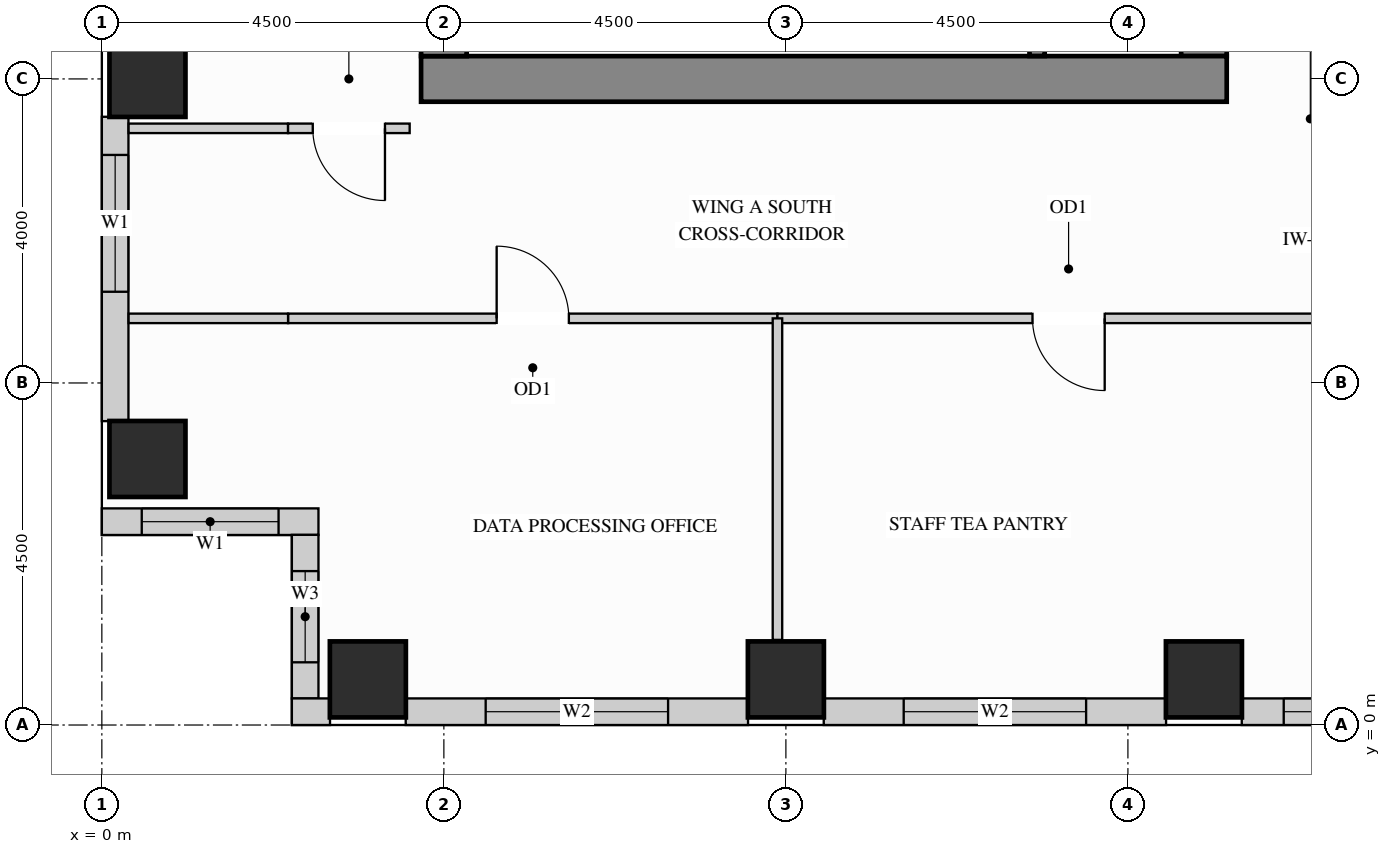
"""IFC4 building model, lengths in metres.
Left out: names, types, materials, properties, quantities, classifications, styles, units other than length and angle.
Written with IfcOpenShell. Run it as: python <this file> out.ifc"""

import sys

from ifc_helpers import new_model, si_unit, direction, frame, frame_2d, origin, origin_2d, place, context, subcontext, project, spatial, rectangle, extrude, source, transform, mapped, element, fill, save


model = new_model("IFC4")
c1 = context("Model", 3, precision=1e-05, world=origin(), true_north=direction((0.0, 1.0)))
c2 = subcontext(c1, "Body", "Model", "MODEL_VIEW")
j1 = project(units=[si_unit("LENGTHUNIT", "METRE"), si_unit("PLANEANGLEUNIT", "RADIAN")], contexts=[c1])
p1 = place(None, origin())
s1 = spatial("IfcSite", under=j1, at=p1, CompositionType="ELEMENT")
p2 = place(p1, origin())
s2 = spatial("IfcBuilding", under=s1, at=p2, CompositionType="ELEMENT")
p3 = place(p2, frame((0.0, 0.0, 186.3)))
s3 = spatial("IfcBuildingStorey", under=s2, at=p3, CompositionType="ELEMENT", Elevation=186.3)
m1 = source(origin(), c2, "Body", "SweptSolid", [
    extrude(rectangle(XDim=1.0, YDim=1.0, at=origin_2d()), origin(), (0.0, 0.0, 1.0), 3.4),
])
for number, where, z_axis, x_axis in (
    (1, (14.5, 0.6, 0.0), (0.0, 0.0, 1.0), (1.0, 0.0, 0.0)),
    (2, (3.5, 0.6, 0.0), (0.0, 0.0, 1.0), (1.0, 0.0, 0.0)),
    (3, (9.0, 0.6, 0.0), (0.0, 0.0, 1.0), (1.0, 0.0, 0.0)),
    (4, (0.6, 3.5, 0.0), (0.0, 0.0, 1.0), (1.0, 0.0, 0.0)),
    (5, (0.6, 8.5, 0.0), (0.0, 0.0, 1.0), (1.0, 0.0, 0.0)),
):
    element("IfcColumn", number, at=place(p3, frame(where, z_axis=z_axis, x_axis=x_axis)), inside=s3, PredefinedType="COLUMN", context=c2, shape_type="MappedRepresentation", body=[
        mapped(m1, transform((0.0, 0.0, 0.0), x_axis=(1.0, 0.0, 0.0), y_axis=(0.0, 1.0, 0.0), z_axis=(0.0, 0.0, 1.0))),
    ])
m2 = source(origin(), c2, "Body", "SweptSolid", [
    extrude(rectangle(XDim=10.02, YDim=0.6, at=frame_2d((5.01, 0.0))), origin(), (0.0, 0.0, 1.0), 3.4),
])
p4 = place(p3, frame((14.5, 8.8, 0.0), z_axis=(0.0, 0.0, 1.0), x_axis=(0.0, 1.0, 0.0)))
e6 = element("IfcWall", 6, at=p4, inside=s3, PredefinedType="SHEAR", context=c2, shape_type="MappedRepresentation", body=[
    mapped(m2, transform((0.0, 0.0, 0.0), x_axis=(1.0, 0.0, 0.0), y_axis=(0.0, 1.0, 0.0), z_axis=(0.0, 0.0, 1.0))),
])
m3 = source(origin(), c2, "Body", "SweptSolid", [
    extrude(rectangle(XDim=10.6, YDim=0.6, at=frame_2d((5.3, 0.0))), origin(), (0.0, 0.0, 1.0), 3.4),
])
p5 = place(p3, frame((4.2, 8.5, 0.0), z_axis=(0.0, 0.0, 1.0), x_axis=(1.0, 0.0, 0.0)))
e7 = element("IfcWall", 7, at=p5, inside=s3, PredefinedType="SHEAR", context=c2, shape_type="MappedRepresentation", body=[
    mapped(m3, transform((0.0, 0.0, 0.0), x_axis=(1.0, 0.0, 0.0), y_axis=(0.0, 1.0, 0.0), z_axis=(0.0, 0.0, 1.0))),
])
m4 = source(origin(), c2, "Body", "SweptSolid", [
    extrude(rectangle(XDim=20.4, YDim=0.6, at=frame_2d((10.2, 0.0))), origin(), (0.0, 0.0, 1.0), 3.4),
])
p6 = place(p3, frame((4.5, 8.8, 0.0), z_axis=(0.0, 0.0, 1.0), x_axis=(0.0, 1.0, 0.0)))
e8 = element("IfcWall", 8, at=p6, inside=s3, PredefinedType="SHEAR", context=c2, shape_type="MappedRepresentation", body=[
    mapped(m4, transform((0.0, 0.0, 0.0), x_axis=(1.0, 0.0, 0.0), y_axis=(0.0, 1.0, 0.0), z_axis=(0.0, 0.0, 1.0))),
])
p7 = place(p3, frame((0.175, 8.002, 0.0), z_axis=(0.0, 0.0, 1.0), x_axis=(0.0, -1.0, 0.0)))
e9 = element("IfcWall", 9, at=p7, inside=s3, PredefinedType="SOLIDWALL", context=c2, shape_type="SweptSolid", body=[
    extrude(rectangle(XDim=4.004, YDim=0.35, at=frame_2d((2.002, 0.0))), origin(), (0.0, 0.0, 1.0), 2.612),
])
p8 = place(p7, frame((0.502, 0.0, 0.78)))
e10 = element("IfcOpeningElement", 10, at=p8, cuts=e9, PredefinedType="OPENING", context=c2, shape_type="SweptSolid", body=[
    extrude(rectangle(XDim=1.8, YDim=1.652, at=frame_2d((0.9, 0.826))), frame((0.0, 0.185, 0.0), z_axis=(0.0, -1.0, 0.0), x_axis=(1.0, 0.0, 0.0)), (0.0, 0.0, 1.0), 0.37),
])
p9 = place(p3, frame((0.0, 2.675, 0.0), z_axis=(0.0, 0.0, 1.0), x_axis=(1.0, 0.0, 0.0)))
e11 = element("IfcWall", 11, at=p9, inside=s3, PredefinedType="SOLIDWALL", context=c2, shape_type="SweptSolid", body=[
    extrude(rectangle(XDim=2.85, YDim=0.35, at=frame_2d((1.425, 0.0))), origin(), (0.0, 0.0, 1.0), 3.385),
])
p10 = place(p9, frame((0.525, 0.0, 0.78)))
e12 = element("IfcOpeningElement", 12, at=p10, cuts=e11, PredefinedType="OPENING", context=c2, shape_type="SweptSolid", body=[
    extrude(rectangle(XDim=1.8, YDim=2.1, at=frame_2d((0.9, 1.05))), frame((0.0, 0.185, 0.0), z_axis=(0.0, -1.0, 0.0), x_axis=(1.0, 0.0, 0.0)), (0.0, 0.0, 1.0), 0.37),
])
p11 = place(p3, frame((2.675, 2.502, 0.0), z_axis=(0.0, 0.0, 1.0), x_axis=(0.0, -1.0, 0.0)))
e13 = element("IfcWall", 13, at=p11, inside=s3, PredefinedType="SOLIDWALL", context=c2, shape_type="SweptSolid", body=[
    extrude(rectangle(XDim=2.154, YDim=0.35, at=frame_2d((1.077, 0.0))), origin(), (0.0, 0.0, 1.0), 3.385),
])
p12 = place(p11, frame((0.477, 0.0, 0.78)))
e14 = element("IfcOpeningElement", 14, at=p12, cuts=e13, PredefinedType="OPENING", context=c2, shape_type="SweptSolid", body=[
    extrude(rectangle(XDim=1.2, YDim=2.1, at=frame_2d((0.6, 1.05))), frame((0.0, 0.185, 0.0), z_axis=(0.0, -1.0, 0.0), x_axis=(1.0, 0.0, 0.0)), (0.0, 0.0, 1.0), 0.37),
])
m5 = source(origin(), c2, "Body", "SweptSolid", [
    extrude(rectangle(XDim=0.502, YDim=0.35, at=frame_2d((0.251, 0.0))), origin(), (0.0, 0.0, 1.0), 3.385),
])
p13 = place(p3, frame((2.5, 0.175, 0.0), z_axis=(0.0, 0.0, 1.0), x_axis=(1.0, 0.0, 0.0)))
e15 = element("IfcWall", 15, at=p13, inside=s3, PredefinedType="SOLIDWALL", context=c2, shape_type="MappedRepresentation", body=[
    mapped(m5, transform((0.0, 0.0, 0.0), x_axis=(1.0, 0.0, 0.0), y_axis=(0.0, 1.0, 0.0), z_axis=(0.0, 0.0, 1.0))),
])
p14 = place(p3, frame((3.998, 0.175, 0.0), z_axis=(0.0, 0.0, 1.0), x_axis=(1.0, 0.0, 0.0)))
e16 = element("IfcWall", 16, at=p14, inside=s3, PredefinedType="SOLIDWALL", context=c2, shape_type="SweptSolid", body=[
    extrude(rectangle(XDim=4.504, YDim=0.35, at=frame_2d((2.252, 0.0))), origin(), (0.0, 0.0, 1.0), 2.612),
])
p15 = place(p14, frame((1.052, 0.0, 0.78)))
e17 = element("IfcOpeningElement", 17, at=p15, cuts=e16, PredefinedType="OPENING", context=c2, shape_type="SweptSolid", body=[
    extrude(rectangle(XDim=2.4, YDim=1.652, at=frame_2d((1.2, 0.826))), frame((0.0, 0.185, 0.0), z_axis=(0.0, -1.0, 0.0), x_axis=(1.0, 0.0, 0.0)), (0.0, 0.0, 1.0), 0.37),
])
p16 = place(p3, frame((9.498, 0.175, 0.0), z_axis=(0.0, 0.0, 1.0), x_axis=(1.0, 0.0, 0.0)))
e18 = element("IfcWall", 18, at=p16, inside=s3, PredefinedType="SOLIDWALL", context=c2, shape_type="SweptSolid", body=[
    extrude(rectangle(XDim=4.504, YDim=0.35, at=frame_2d((2.252, 0.0))), origin(), (0.0, 0.0, 1.0), 2.612),
])
p17 = place(p16, frame((1.052, 0.0, 0.78)))
e19 = element("IfcOpeningElement", 19, at=p17, cuts=e18, PredefinedType="OPENING", context=c2, shape_type="SweptSolid", body=[
    extrude(rectangle(XDim=2.4, YDim=1.652, at=frame_2d((1.2, 0.826))), frame((0.0, 0.185, 0.0), z_axis=(0.0, -1.0, 0.0), x_axis=(1.0, 0.0, 0.0)), (0.0, 0.0, 1.0), 0.37),
])
p18 = place(p3, frame((14.998, 0.175, 0.0), z_axis=(0.0, 0.0, 1.0), x_axis=(1.0, 0.0, 0.0)))
e20 = element("IfcWall", 20, at=p18, inside=s3, PredefinedType="SOLIDWALL", context=c2, shape_type="SweptSolid", body=[
    extrude(rectangle(XDim=3.504, YDim=0.35, at=frame_2d((1.752, 0.0))), origin(), (0.0, 0.0, 1.0), 2.612),
])
p19 = place(p18, frame((0.552, 0.0, 0.78)))
e21 = element("IfcOpeningElement", 21, at=p19, cuts=e20, PredefinedType="OPENING", context=c2, shape_type="SweptSolid", body=[
    extrude(rectangle(XDim=2.4, YDim=1.652, at=frame_2d((1.2, 0.826))), frame((0.0, 0.185, 0.0), z_axis=(0.0, -1.0, 0.0), x_axis=(1.0, 0.0, 0.0)), (0.0, 0.0, 1.0), 0.37),
])
m6 = source(origin(), c2, "Body", "SweptSolid", [
    extrude(rectangle(XDim=2.098, YDim=0.125, at=frame_2d((1.049, 0.0))), origin(), (0.0, 0.0, 1.0), 3.385),
])
p20 = place(p3, frame((0.352, 7.85, 0.0), z_axis=(0.0, 0.0, 1.0), x_axis=(1.0, 0.0, 0.0)))
e22 = element("IfcWall", 22, at=p20, inside=s3, PredefinedType="PARTITIONING", context=c2, shape_type="MappedRepresentation", body=[
    mapped(m6, transform((0.0, 0.0, 0.0), x_axis=(1.0, 0.0, 0.0), y_axis=(0.0, 1.0, 0.0), z_axis=(0.0, 0.0, 1.0))),
])
p21 = place(p3, frame((2.45, 7.85, 0.0), z_axis=(0.0, 0.0, 1.0), x_axis=(1.0, 0.0, 0.0)))
e23 = element("IfcWall", 23, at=p21, inside=s3, PredefinedType="PARTITIONING", context=c2, shape_type="SweptSolid", body=[
    extrude(rectangle(XDim=1.6, YDim=0.125, at=frame_2d((0.8, 0.0))), origin(), (0.0, 0.0, 1.0), 3.385),
])
p22 = place(p21, frame((0.325, 0.0, 0.0)))
e24 = element("IfcOpeningElement", 24, at=p22, cuts=e23, PredefinedType="OPENING", context=c2, shape_type="SweptSolid", body=[
    extrude(rectangle(XDim=0.95, YDim=2.15, at=frame_2d((0.475, 1.075))), frame((0.0, 0.073, 0.0), z_axis=(0.0, -1.0, 0.0), x_axis=(1.0, 0.0, 0.0)), (0.0, 0.0, 1.0), 0.145),
])
p23 = place(p3, frame((2.45, 5.35, 0.0), z_axis=(0.0, 0.0, 1.0), x_axis=(1.0, 0.0, 0.0)))
e25 = element("IfcWall", 25, at=p23, inside=s3, PredefinedType="PARTITIONING", context=c2, shape_type="SweptSolid", body=[
    extrude(rectangle(XDim=6.439, YDim=0.125, at=frame_2d((3.219, 0.0))), origin(), (0.0, 0.0, 1.0), 3.385),
])
p24 = place(p23, frame((2.744, 0.0, 0.0)))
e26 = element("IfcOpeningElement", 26, at=p24, cuts=e25, PredefinedType="OPENING", context=c2, shape_type="SweptSolid", body=[
    extrude(rectangle(XDim=0.95, YDim=2.15, at=frame_2d((0.475, 1.075))), frame((0.0, 0.073, 0.0), z_axis=(0.0, -1.0, 0.0), x_axis=(1.0, 0.0, 0.0)), (0.0, 0.0, 1.0), 0.145),
])
p25 = place(p3, frame((8.889, 5.35, 0.0), z_axis=(0.0, 0.0, 1.0), x_axis=(1.0, 0.0, 0.0)))
e27 = element("IfcWall", 27, at=p25, inside=s3, PredefinedType="PARTITIONING", context=c2, shape_type="SweptSolid", body=[
    extrude(rectangle(XDim=7.661, YDim=0.125, at=frame_2d((3.831, 0.0))), origin(), (0.0, 0.0, 1.0), 3.385),
])
p26 = place(p25, frame((3.355, 0.0, 0.0)))
e28 = element("IfcOpeningElement", 28, at=p26, cuts=e27, PredefinedType="OPENING", context=c2, shape_type="SweptSolid", body=[
    extrude(rectangle(XDim=0.95, YDim=2.15, at=frame_2d((0.475, 1.075))), frame((0.0, 0.073, 0.0), z_axis=(0.0, -1.0, 0.0), x_axis=(1.0, 0.0, 0.0)), (0.0, 0.0, 1.0), 0.145),
])
p27 = place(p3, frame((0.352, 5.35, 0.0), z_axis=(0.0, 0.0, 1.0), x_axis=(1.0, 0.0, 0.0)))
e29 = element("IfcWall", 29, at=p27, inside=s3, PredefinedType="PARTITIONING", context=c2, shape_type="MappedRepresentation", body=[
    mapped(m6, transform((0.0, 0.0, 0.0), x_axis=(1.0, 0.0, 0.0), y_axis=(0.0, 1.0, 0.0), z_axis=(0.0, 0.0, 1.0))),
])
m7 = source(origin(), c2, "Body", "SweptSolid", [
    extrude(rectangle(XDim=4.23, YDim=0.125, at=frame_2d((2.115, 0.0))), origin(), (0.0, 0.0, 1.0), 3.385),
])
p28 = place(p3, frame((8.889, 1.12, 0.0), z_axis=(0.0, 0.0, 1.0), x_axis=(0.0, 1.0, 0.0)))
e30 = element("IfcWall", 30, at=p28, inside=s3, PredefinedType="PARTITIONING", context=c2, shape_type="MappedRepresentation", body=[
    mapped(m7, transform((0.0, 0.0, 0.0), x_axis=(1.0, 0.0, 0.0), y_axis=(0.0, 1.0, 0.0), z_axis=(0.0, 0.0, 1.0))),
])
m8 = source(origin(), c2, "Body", "SweptSolid", [
    extrude(rectangle(XDim=3.753, YDim=0.2, at=frame_2d((1.876, 0.0))), origin(), (0.0, 0.0, 1.0), 3.4),
])
p29 = place(p3, frame((12.305, 8.802, 0.0), z_axis=(0.0, 0.0, 1.0), x_axis=(0.0, 1.0, 0.0)))
e31 = element("IfcWall", 31, at=p29, inside=s3, PredefinedType="SHEAR", context=c2, shape_type="MappedRepresentation", body=[
    mapped(m8, transform((0.0, 0.0, 0.0), x_axis=(1.0, 0.0, 0.0), y_axis=(0.0, 1.0, 0.0), z_axis=(0.0, 0.0, 1.0))),
])
m9 = source(origin(), c2, "Body", "SweptSolid", [
    extrude(rectangle(XDim=0.95, YDim=2.15, at=frame_2d((0.475, 1.075))), frame((0.0, 0.025, 0.0), z_axis=(0.0, -1.0, 0.0), x_axis=(1.0, 0.0, 0.0)), (0.0, 0.0, 1.0), 0.05),
])
p30 = place(p24, origin())
e32 = element("IfcDoor", 32, at=p30, inside=s3, OperationType="SINGLE_SWING_LEFT", PredefinedType="DOOR", context=c2, shape_type="MappedRepresentation", body=[
    mapped(m9, transform((0.0, 0.0, 0.0), x_axis=(1.0, 0.0, 0.0), y_axis=(0.0, 1.0, 0.0), z_axis=(0.0, 0.0, 1.0))),
])
fill(e26, e32)
p31 = place(p26, origin())
e33 = element("IfcDoor", 33, at=p31, inside=s3, OperationType="SINGLE_SWING_RIGHT", PredefinedType="DOOR", context=c2, shape_type="MappedRepresentation", body=[
    mapped(m9, transform((0.0, 0.0, 0.0), x_axis=(1.0, 0.0, 0.0), y_axis=(0.0, 1.0, 0.0), z_axis=(0.0, 0.0, 1.0))),
])
fill(e28, e33)
p32 = place(p22, origin())
e34 = element("IfcDoor", 34, at=p32, inside=s3, OperationType="SINGLE_SWING_RIGHT", PredefinedType="DOOR", context=c2, shape_type="MappedRepresentation", body=[
    mapped(m9, transform((0.0, 0.0, 0.0), x_axis=(1.0, 0.0, 0.0), y_axis=(0.0, 1.0, 0.0), z_axis=(0.0, 0.0, 1.0))),
])
fill(e24, e34)
m10 = source(origin(), c2, "Body", "SweptSolid", [
    extrude(rectangle(XDim=1.8, YDim=1.652, at=frame_2d((0.9, 0.826))), frame((0.0, 0.03, 0.0), z_axis=(0.0, -1.0, 0.0), x_axis=(1.0, 0.0, 0.0)), (0.0, 0.0, 1.0), 0.06),
])
p33 = place(p8, origin())
e35 = element("IfcWindow", 35, at=p33, inside=s3, PartitioningType="SINGLE_PANEL", PredefinedType="WINDOW", context=c2, shape_type="MappedRepresentation", body=[
    mapped(m10, transform((0.0, 0.0, 0.0), x_axis=(1.0, 0.0, 0.0), y_axis=(0.0, 1.0, 0.0), z_axis=(0.0, 0.0, 1.0))),
])
fill(e10, e35)
m11 = source(origin(), c2, "Body", "SweptSolid", [
    extrude(rectangle(XDim=1.8, YDim=2.1, at=frame_2d((0.9, 1.05))), frame((0.0, 0.03, 0.0), z_axis=(0.0, -1.0, 0.0), x_axis=(1.0, 0.0, 0.0)), (0.0, 0.0, 1.0), 0.06),
])
p34 = place(p10, origin())
e36 = element("IfcWindow", 36, at=p34, inside=s3, PartitioningType="SINGLE_PANEL", PredefinedType="WINDOW", context=c2, shape_type="MappedRepresentation", body=[
    mapped(m11, transform((0.0, 0.0, 0.0), x_axis=(1.0, 0.0, 0.0), y_axis=(0.0, 1.0, 0.0), z_axis=(0.0, 0.0, 1.0))),
])
fill(e12, e36)
m12 = source(origin(), c2, "Body", "SweptSolid", [
    extrude(rectangle(XDim=2.4, YDim=1.652, at=frame_2d((1.2, 0.826))), frame((0.0, 0.03, 0.0), z_axis=(0.0, -1.0, 0.0), x_axis=(1.0, 0.0, 0.0)), (0.0, 0.0, 1.0), 0.06),
])
p35 = place(p15, origin())
e37 = element("IfcWindow", 37, at=p35, inside=s3, PartitioningType="SINGLE_PANEL", PredefinedType="WINDOW", context=c2, shape_type="MappedRepresentation", body=[
    mapped(m12, transform((0.0, 0.0, 0.0), x_axis=(1.0, 0.0, 0.0), y_axis=(0.0, 1.0, 0.0), z_axis=(0.0, 0.0, 1.0))),
])
fill(e17, e37)
p36 = place(p17, origin())
e38 = element("IfcWindow", 38, at=p36, inside=s3, PartitioningType="SINGLE_PANEL", PredefinedType="WINDOW", context=c2, shape_type="MappedRepresentation", body=[
    mapped(m12, transform((0.0, 0.0, 0.0), x_axis=(1.0, 0.0, 0.0), y_axis=(0.0, 1.0, 0.0), z_axis=(0.0, 0.0, 1.0))),
])
fill(e19, e38)
p37 = place(p19, origin())
e39 = element("IfcWindow", 39, at=p37, inside=s3, PartitioningType="SINGLE_PANEL", PredefinedType="WINDOW", context=c2, shape_type="MappedRepresentation", body=[
    mapped(m12, transform((0.0, 0.0, 0.0), x_axis=(1.0, 0.0, 0.0), y_axis=(0.0, 1.0, 0.0), z_axis=(0.0, 0.0, 1.0))),
])
fill(e21, e39)
m13 = source(origin(), c2, "Body", "SweptSolid", [
    extrude(rectangle(XDim=1.2, YDim=2.1, at=frame_2d((0.6, 1.05))), frame((0.0, 0.03, 0.0), z_axis=(0.0, -1.0, 0.0), x_axis=(1.0, 0.0, 0.0)), (0.0, 0.0, 1.0), 0.06),
])
p38 = place(p12, origin())
e40 = element("IfcWindow", 40, at=p38, inside=s3, PartitioningType="SINGLE_PANEL", PredefinedType="WINDOW", context=c2, shape_type="MappedRepresentation", body=[
    mapped(m13, transform((0.0, 0.0, 0.0), x_axis=(1.0, 0.0, 0.0), y_axis=(0.0, 1.0, 0.0), z_axis=(0.0, 0.0, 1.0))),
])
fill(e14, e40)
save(model, sys.argv[1])
